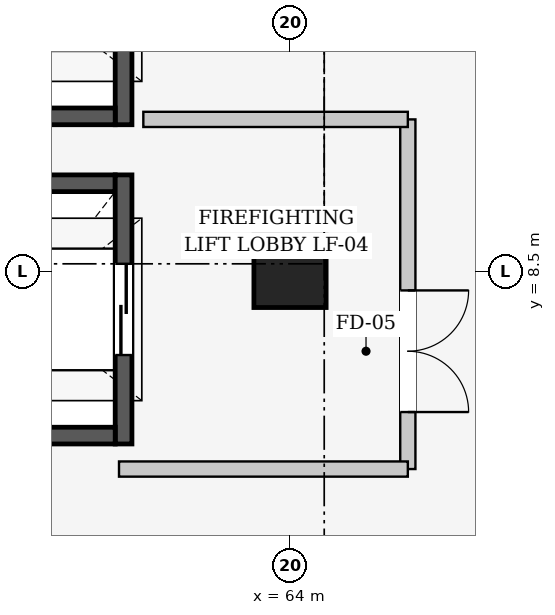
"""IFC4 building model, lengths in metres.
Left out: names, types, materials, properties, quantities, classifications, styles, units other than length and angle.
Written with IfcOpenShell. Run it as: python <this file> out.ifc"""

import sys

from ifc_helpers import new_model, si_unit, direction, frame, frame_2d, origin, origin_2d, place, context, subcontext, project, spatial, rectangle, extrude, element, fill, save


model = new_model("IFC4")
c1 = context("Model", 3, precision=1e-05, world=origin(), true_north=direction((0.0, 1.0)))
c2 = subcontext(c1, "Body", "Model", "MODEL_VIEW")
j1 = project(units=[si_unit("LENGTHUNIT", "METRE"), si_unit("PLANEANGLEUNIT", "RADIAN")], contexts=[c1])
p1 = place(None, origin())
s1 = spatial("IfcSite", under=j1, at=p1, CompositionType="ELEMENT")
p2 = place(p1, origin())
s2 = spatial("IfcBuilding", under=s1, at=p2, CompositionType="ELEMENT")
p3 = place(p2, frame((0.0, 0.0, 6.0)))
s3 = spatial("IfcBuildingStorey", under=s2, at=p3, CompositionType="ELEMENT", Elevation=6.0)
p4 = place(p3, frame((64.0, 8.5, 0.0), z_axis=(0.0, 0.0, 1.0), x_axis=(1.0, 0.0, 0.0)))
e1 = element("IfcColumn", 1, at=p4, inside=s3, PredefinedType="COLUMN", context=c2, shape_type="SweptSolid", body=[
    extrude(rectangle(XDim=0.95, YDim=0.95, at=origin_2d()), origin(), (0.0, 0.0, 1.0), 5.4),
])
p5 = place(p3, frame((59.3, 9.66, 0.0), z_axis=(0.0, 0.0, 1.0), x_axis=(1.0, 0.0, 0.0)))
e2 = element("IfcWall", 2, at=p5, inside=s3, PredefinedType="SHEAR", context=c2, shape_type="SweptSolid", body=[
    extrude(rectangle(XDim=2.4, YDim=0.22, at=frame_2d((1.2, 0.0))), origin(), (0.0, 0.0, 1.0), 5.4),
])
p6 = place(p3, frame((61.81, 9.77, 0.0), z_axis=(0.0, 0.0, 1.0), x_axis=(0.0, -1.0, 0.0)))
e3 = element("IfcWall", 3, at=p6, inside=s3, PredefinedType="SHEAR", context=c2, shape_type="SweptSolid", body=[
    extrude(rectangle(XDim=3.54, YDim=0.22, at=frame_2d((1.77, 0.0))), origin(), (0.0, 0.0, 1.0), 5.4),
])
p7 = place(p6, frame((1.17, 0.0, 0.0)))
e4 = element("IfcOpeningElement", 4, at=p7, cuts=e3, PredefinedType="OPENING", context=c2, shape_type="SweptSolid", body=[
    extrude(rectangle(XDim=1.2, YDim=2.2, at=frame_2d((0.6, 1.1))), frame((0.0, 0.12, 0.0), z_axis=(0.0, -1.0, 0.0), x_axis=(1.0, 0.0, 0.0)), (0.0, 0.0, 1.0), 0.24),
])
p8 = place(p3, frame((61.7, 6.34, 0.0), z_axis=(0.0, 0.0, 1.0), x_axis=(-1.0, 0.0, 0.0)))
e5 = element("IfcWall", 5, at=p8, inside=s3, PredefinedType="SHEAR", context=c2, shape_type="SweptSolid", body=[
    extrude(rectangle(XDim=2.4, YDim=0.22, at=frame_2d((1.2, 0.0))), origin(), (0.0, 0.0, 1.0), 5.4),
])
p9 = place(p3, frame((61.81, 13.97, 0.0), z_axis=(0.0, 0.0, 1.0), x_axis=(0.0, -1.0, 0.0)))
e6 = element("IfcWall", 6, at=p9, inside=s3, PredefinedType="SHEAR", context=c2, shape_type="SweptSolid", body=[
    extrude(rectangle(XDim=3.54, YDim=0.22, at=frame_2d((1.77, 0.0))), origin(), (0.0, 0.0, 1.0), 5.4),
])
p10 = place(p9, frame((1.22, 0.0, 0.0)))
e7 = element("IfcOpeningElement", 7, at=p10, cuts=e6, PredefinedType="OPENING", context=c2, shape_type="SweptSolid", body=[
    extrude(rectangle(XDim=1.1, YDim=2.2, at=frame_2d((0.55, 1.1))), frame((0.0, 0.12, 0.0), z_axis=(0.0, -1.0, 0.0), x_axis=(1.0, 0.0, 0.0)), (0.0, 0.0, 1.0), 0.24),
])
p11 = place(p3, frame((61.7, 10.54, 0.0), z_axis=(0.0, 0.0, 1.0), x_axis=(-1.0, 0.0, 0.0)))
e8 = element("IfcWall", 8, at=p11, inside=s3, PredefinedType="SHEAR", context=c2, shape_type="SweptSolid", body=[
    extrude(rectangle(XDim=2.4, YDim=0.22, at=frame_2d((1.2, 0.0))), origin(), (0.0, 0.0, 1.0), 5.4),
])
p12 = place(p3, frame((65.55, 10.5, 0.0), z_axis=(0.0, 0.0, 1.0), x_axis=(0.0, -1.0, 0.0)))
e9 = element("IfcWall", 9, at=p12, inside=s3, PredefinedType="PARTITIONING", context=c2, shape_type="SweptSolid", body=[
    extrude(rectangle(XDim=4.6, YDim=0.2, at=frame_2d((2.3, 0.0))), origin(), (0.0, 0.0, 1.0), 4.145),
])
p13 = place(p12, frame((2.25, 0.0, 0.0)))
e10 = element("IfcOpeningElement", 10, at=p13, cuts=e9, PredefinedType="OPENING", context=c2, shape_type="SweptSolid", body=[
    extrude(rectangle(XDim=1.6, YDim=2.2, at=frame_2d((0.8, 1.1))), frame((0.0, 0.11, 0.0), z_axis=(0.0, -1.0, 0.0), x_axis=(1.0, 0.0, 0.0)), (0.0, 0.0, 1.0), 0.22),
])
p14 = place(p3, frame((62.07, 10.5, 0.0), z_axis=(0.0, 0.0, 1.0), x_axis=(1.0, 0.0, 0.0)))
e11 = element("IfcWall", 11, at=p14, inside=s3, PredefinedType="PARTITIONING", context=c2, shape_type="SweptSolid", body=[
    extrude(rectangle(XDim=3.48, YDim=0.2, at=frame_2d((1.74, 0.0))), origin(), (0.0, 0.0, 1.0), 4.445),
])
p15 = place(p3, frame((65.55, 5.9, 0.0), z_axis=(0.0, 0.0, 1.0), x_axis=(-1.0, 0.0, 0.0)))
e12 = element("IfcWall", 12, at=p15, inside=s3, PredefinedType="PARTITIONING", context=c2, shape_type="SweptSolid", body=[
    extrude(rectangle(XDim=3.8, YDim=0.2, at=frame_2d((1.9, 0.0))), origin(), (0.0, 0.0, 1.0), 4.445),
])
p16 = place(p7, origin())
e13 = element("IfcDoor", 13, at=p16, inside=s3, OperationType="SLIDING_TO_LEFT", PredefinedType="DOOR", context=c2, shape_type="SweptSolid", body=[
    extrude(rectangle(XDim=1.2, YDim=2.2, at=frame_2d((0.6, 1.1))), frame((0.0, 0.025, 0.0), z_axis=(0.0, -1.0, 0.0), x_axis=(1.0, 0.0, 0.0)), (0.0, 0.0, 1.0), 0.05),
])
fill(e4, e13)
p17 = place(p13, origin())
e14 = element("IfcDoor", 14, at=p17, inside=s3, OperationType="DOUBLE_DOOR_SINGLE_SWING", PredefinedType="DOOR", context=c2, shape_type="SweptSolid", body=[
    extrude(rectangle(XDim=1.6, YDim=2.2, at=frame_2d((0.8, 1.1))), frame((0.0, 0.025, 0.0), z_axis=(0.0, -1.0, 0.0), x_axis=(1.0, 0.0, 0.0)), (0.0, 0.0, 1.0), 0.05),
])
fill(e10, e14)
save(model, sys.argv[1])
